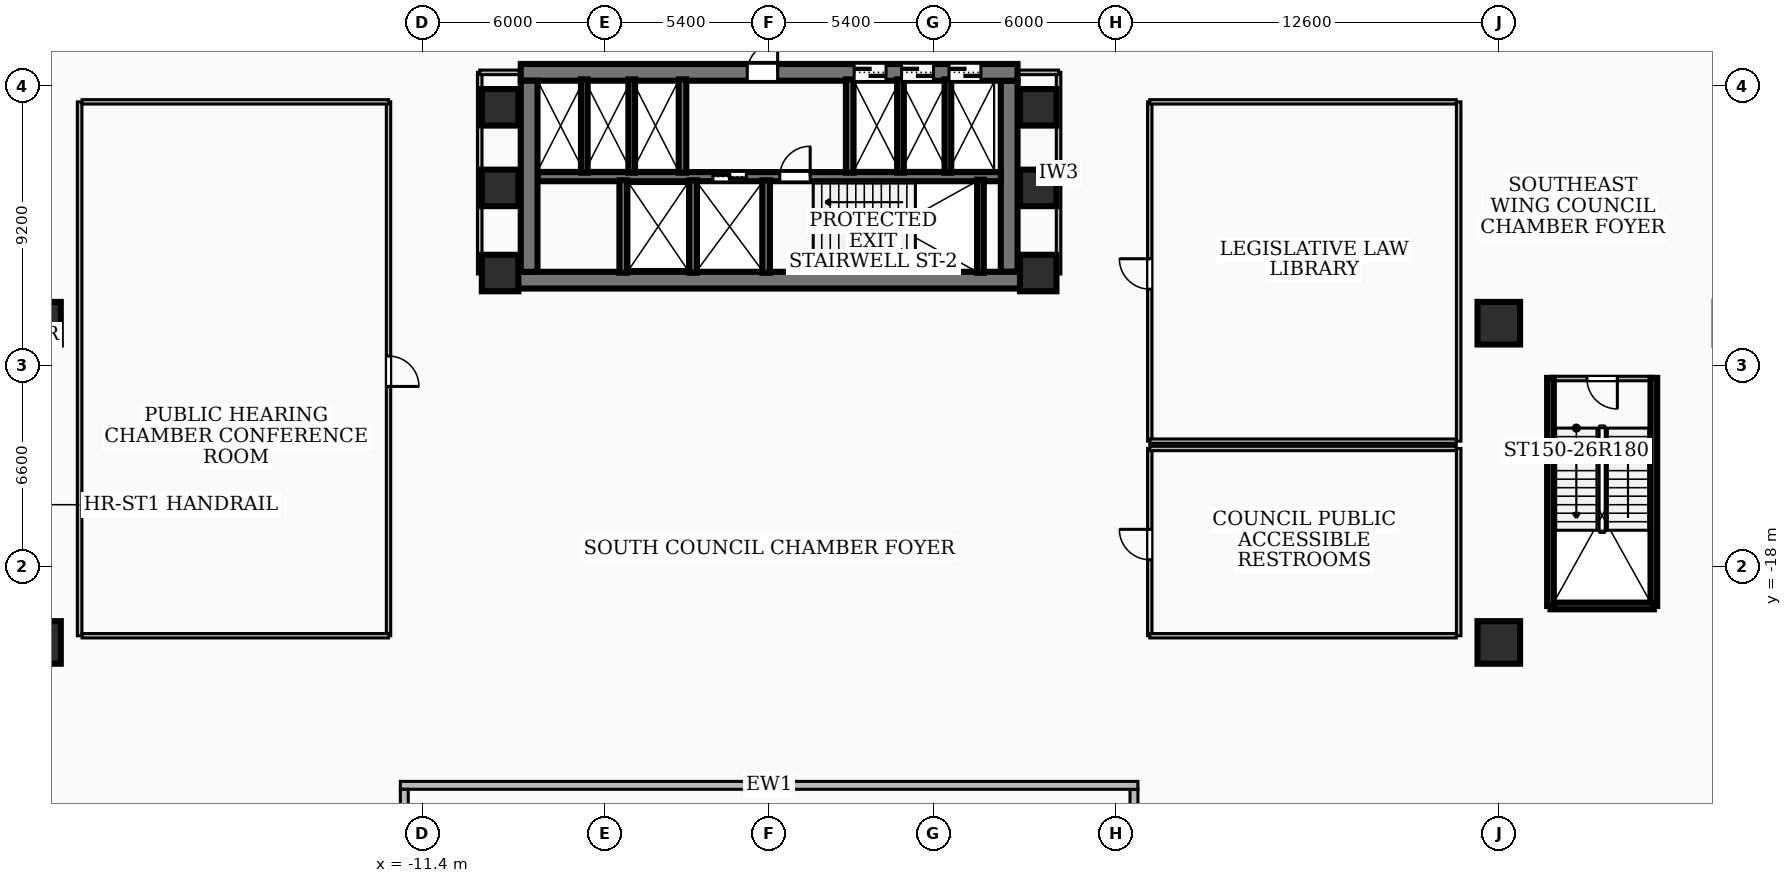
"""IFC4 building model, lengths in metres.
Left out: names, types, materials, properties, quantities, classifications, styles, units other than length and angle.
Written with IfcOpenShell. Run it as: python <this file> out.ifc"""

import sys

from ifc_helpers import new_model, si_unit, direction, frame, frame_2d, origin, origin_2d, place, context, subcontext, project, spatial, rectangle, extrude, element, fill, save


model = new_model("IFC4")
c1 = context("Model", 3, precision=1e-05, world=origin(), true_north=direction((0.0, 1.0)))
c2 = subcontext(c1, "Body", "Model", "MODEL_VIEW")
j1 = project(units=[si_unit("LENGTHUNIT", "METRE"), si_unit("PLANEANGLEUNIT", "RADIAN")], contexts=[c1])
p1 = place(None, origin())
s1 = spatial("IfcSite", under=j1, at=p1, CompositionType="ELEMENT")
p2 = place(p1, origin())
s2 = spatial("IfcBuilding", under=s1, at=p2, CompositionType="ELEMENT")
p3 = place(p2, frame((0.0, 0.0, 10.08)))
s3 = spatial("IfcBuildingStorey", under=s2, at=p3, CompositionType="ELEMENT", Elevation=10.08)
p4 = place(p3, frame((8.78, -8.585, 0.0), z_axis=(0.0, 0.0, 1.0), x_axis=(-1.0, 0.0, 0.0)))
e1 = element("IfcWall", 1, at=p4, inside=s3, PredefinedType="SHEAR", context=c2, shape_type="SweptSolid", body=[
    extrude(rectangle(XDim=17.56, YDim=0.55, at=frame_2d((8.78, 0.0))), origin(), (0.0, 0.0, 1.0), 4.36),
])
p5 = place(p3, frame((-8.17, -1.75, 0.0), z_axis=(0.0, 0.0, 1.0), x_axis=(1.0, 0.0, 0.0)))
e2 = element("IfcWall", 2, at=p5, inside=s3, PredefinedType="SHEAR", context=c2, shape_type="SweptSolid", body=[
    extrude(rectangle(XDim=16.34, YDim=0.55, at=frame_2d((8.17, 0.0))), origin(), (0.0, 0.0, 1.0), 4.36),
])
p6 = place(p5, frame((7.45, 0.0, 0.0)))
e3 = element("IfcOpeningElement", 3, at=p6, cuts=e2, PredefinedType="OPENING", context=c2, shape_type="SweptSolid", body=[
    extrude(rectangle(XDim=1.0, YDim=2.1, at=frame_2d((0.5, 1.05))), frame((0.0, 0.285, 0.0), z_axis=(0.0, -1.0, 0.0), x_axis=(1.0, 0.0, 0.0)), (0.0, 0.0, 1.0), 0.57),
])
p7 = place(p5, frame((10.965, 0.0, 0.0)))
e4 = element("IfcOpeningElement", 4, at=p7, cuts=e2, PredefinedType="OPENING", context=c2, shape_type="SweptSolid", body=[
    extrude(rectangle(XDim=1.05, YDim=2.15, at=frame_2d((0.525, 1.075))), frame((0.0, 0.285, 0.0), z_axis=(0.0, -1.0, 0.0), x_axis=(1.0, 0.0, 0.0)), (0.0, 0.0, 1.0), 0.57),
])
p8 = place(p5, frame((12.525, 0.0, 0.0)))
e5 = element("IfcOpeningElement", 5, at=p8, cuts=e2, PredefinedType="OPENING", context=c2, shape_type="SweptSolid", body=[
    extrude(rectangle(XDim=1.05, YDim=2.15, at=frame_2d((0.525, 1.075))), frame((0.0, 0.285, 0.0), z_axis=(0.0, -1.0, 0.0), x_axis=(1.0, 0.0, 0.0)), (0.0, 0.0, 1.0), 0.57),
])
p9 = place(p5, frame((14.085, 0.0, 0.0)))
e6 = element("IfcOpeningElement", 6, at=p9, cuts=e2, PredefinedType="OPENING", context=c2, shape_type="SweptSolid", body=[
    extrude(rectangle(XDim=1.05, YDim=2.15, at=frame_2d((0.525, 1.075))), frame((0.0, 0.285, 0.0), z_axis=(0.0, -1.0, 0.0), x_axis=(1.0, 0.0, 0.0)), (0.0, 0.0, 1.0), 0.57),
])
for number, where, z_axis, x_axis in (
    (7, (-7.895, -8.31, 0.0), (0.0, 0.0, 1.0), (0.0, 1.0, 0.0)),
    (8, (7.895, -2.025, 0.0), (0.0, 0.0, 1.0), (0.0, -1.0, 0.0)),
):
    element("IfcWall", number, at=place(p3, frame(where, z_axis=z_axis, x_axis=x_axis)), inside=s3, PredefinedType="SHEAR", context=c2, shape_type="SweptSolid", body=[
        extrude(rectangle(XDim=6.285, YDim=0.55, at=frame_2d((3.143, 0.0))), origin(), (0.0, 0.0, 1.0), 4.36),
    ])
p10 = place(p3, frame((-7.62, -5.18, 0.0), z_axis=(0.0, 0.0, 1.0), x_axis=(1.0, 0.0, 0.0)))
e9 = element("IfcWall", 9, at=p10, inside=s3, PredefinedType="SOLIDWALL", context=c2, shape_type="SweptSolid", body=[
    extrude(rectangle(XDim=15.24, YDim=0.3, at=frame_2d((7.62, 0.0))), origin(), (0.0, 0.0, 1.0), 4.36),
])
p11 = place(p10, frame((5.77, 0.0, 0.0)))
e10 = element("IfcOpeningElement", 10, at=p11, cuts=e9, PredefinedType="OPENING", context=c2, shape_type="SweptSolid", body=[
    extrude(rectangle(XDim=1.1, YDim=2.15, at=frame_2d((0.55, 1.075))), frame((0.0, 0.16, 0.0), z_axis=(0.0, -1.0, 0.0), x_axis=(1.0, 0.0, 0.0)), (0.0, 0.0, 1.0), 0.32),
])
p12 = place(p10, frame((7.97, 0.0, 0.0)))
e11 = element("IfcOpeningElement", 11, at=p12, cuts=e9, PredefinedType="OPENING", context=c2, shape_type="SweptSolid", body=[
    extrude(rectangle(XDim=1.0, YDim=2.1, at=frame_2d((0.5, 1.05))), frame((0.0, 0.16, 0.0), z_axis=(0.0, -1.0, 0.0), x_axis=(1.0, 0.0, 0.0)), (0.0, 0.0, 1.0), 0.32),
])
p13 = place(p3, frame((6.95, -8.34, 0.0), z_axis=(0.0, 0.0, 1.0), x_axis=(0.0, 1.0, 0.0)))
e12 = element("IfcWall", 12, at=p13, inside=s3, PredefinedType="SOLIDWALL", context=c2, shape_type="SweptSolid", body=[
    extrude(rectangle(XDim=3.06, YDim=0.22, at=frame_2d((1.53, 0.0))), origin(), (0.0, 0.0, 1.0), 4.36),
])
for number, where, z_axis, x_axis in (
    (13, (-0.1, -8.34, 0.0), (0.0, 0.0, 1.0), (0.0, 1.0, 0.0)),
    (14, (-2.5, -8.34, 0.0), (0.0, 0.0, 1.0), (0.0, 1.0, 0.0)),
    (15, (-4.8, -8.34, 0.0), (0.0, 0.0, 1.0), (0.0, 1.0, 0.0)),
):
    element("IfcWall", number, at=place(p3, frame(where, z_axis=z_axis, x_axis=x_axis)), inside=s3, PredefinedType="SOLIDWALL", context=c2, shape_type="SweptSolid", body=[
        extrude(rectangle(XDim=3.04, YDim=0.25, at=frame_2d((1.52, 0.0))), origin(), (0.0, 0.0, 1.0), 4.36),
    ])
for number, where, z_axis, x_axis in (
    (16, (-2.85, -5.05, 0.0), (0.0, 0.0, 1.0), (0.0, 1.0, 0.0)),
    (17, (2.65, -5.05, 0.0), (0.0, 0.0, 1.0), (0.0, 1.0, 0.0)),
):
    element("IfcWall", number, at=place(p3, frame(where, z_axis=z_axis, x_axis=x_axis)), inside=s3, PredefinedType="SOLIDWALL", context=c2, shape_type="SweptSolid", body=[
        extrude(rectangle(XDim=3.07, YDim=0.25, at=frame_2d((1.535, 0.0))), origin(), (0.0, 0.0, 1.0), 4.36),
    ])
for number, where, z_axis, x_axis in (
    (18, (4.32, -5.05, 0.0), (0.0, 0.0, 1.0), (0.0, 1.0, 0.0)),
    (19, (5.88, -5.05, 0.0), (0.0, 0.0, 1.0), (0.0, 1.0, 0.0)),
    (20, (-6.08, -5.05, 0.0), (0.0, 0.0, 1.0), (0.0, 1.0, 0.0)),
    (21, (-4.52, -5.05, 0.0), (0.0, 0.0, 1.0), (0.0, 1.0, 0.0)),
):
    element("IfcWall", number, at=place(p3, frame(where, z_axis=z_axis, x_axis=x_axis)), inside=s3, PredefinedType="SOLIDWALL", context=c2, shape_type="SweptSolid", body=[
        extrude(rectangle(XDim=3.07, YDim=0.22, at=frame_2d((1.535, 0.0))), origin(), (0.0, 0.0, 1.0), 4.36),
    ])
for number, where, z_axis, x_axis in (
    (22, (25.7, -19.3, 0.0), (0.0, 0.0, 1.0), (0.0, 1.0, 0.0)),
    (23, (29.1, -19.3, 0.0), (0.0, 0.0, 1.0), (0.0, 1.0, 0.0)),
):
    element("IfcWall", number, at=place(p3, frame(where, z_axis=z_axis, x_axis=x_axis)), inside=s3, PredefinedType="SOLIDWALL", context=c2, shape_type="SweptSolid", body=[
        extrude(rectangle(XDim=7.5, YDim=0.22, at=frame_2d((3.75, 0.0))), origin(), (0.0, 0.0, 1.0), 4.36),
    ])
p14 = place(p3, frame((25.7, -19.3, 0.0), z_axis=(0.0, 0.0, 1.0), x_axis=(1.0, 0.0, 0.0)))
e24 = element("IfcWall", 24, at=p14, inside=s3, PredefinedType="SOLIDWALL", context=c2, shape_type="SweptSolid", body=[
    extrude(rectangle(XDim=3.4, YDim=0.22, at=frame_2d((1.7, 0.0))), origin(), (0.0, 0.0, 1.0), 4.36),
])
for number, where, z_axis, x_axis in (
    (25, (-8.85, -5.55, 0.0), (0.0, 0.0, 1.0), (1.0, 0.0, 0.0)),
    (26, (-8.85, -2.9, 0.0), (0.0, 0.0, 1.0), (1.0, 0.0, 0.0)),
    (27, (8.85, -5.55, 0.0), (0.0, 0.0, 1.0), (1.0, 0.0, 0.0)),
    (28, (8.85, -2.9, 0.0), (0.0, 0.0, 1.0), (1.0, 0.0, 0.0)),
    (29, (8.85, -8.35, 0.0), (0.0, 0.0, 1.0), (1.0, 0.0, 0.0)),
    (30, (-8.85, -8.35, 0.0), (0.0, 0.0, 1.0), (1.0, 0.0, 0.0)),
):
    element("IfcColumn", number, at=place(p3, frame(where, z_axis=z_axis, x_axis=x_axis)), inside=s3, PredefinedType="COLUMN", context=c2, shape_type="SweptSolid", body=[
        extrude(rectangle(XDim=1.2, YDim=1.2, at=origin_2d()), origin(), (0.0, 0.0, 1.0), 4.68),
    ])
for number, where, z_axis, x_axis in (
    (31, (-24.0, -10.0, 0.0), (0.0, 0.0, 1.0), (1.0, 0.0, 0.0)),
    (32, (24.0, -10.0, 0.0), (0.0, 0.0, 1.0), (1.0, 0.0, 0.0)),
    (33, (-24.0, -20.5, 0.0), (0.0, 0.0, 1.0), (1.0, 0.0, 0.0)),
    (34, (24.0, -20.5, 0.0), (0.0, 0.0, 1.0), (1.0, 0.0, 0.0)),
):
    element("IfcColumn", number, at=place(p3, frame(where, z_axis=z_axis, x_axis=x_axis)), inside=s3, PredefinedType="COLUMN", context=c2, shape_type="SweptSolid", body=[
        extrude(rectangle(XDim=1.4, YDim=1.4, at=origin_2d()), origin(), (0.0, 0.0, 1.0), 4.68),
    ])
p15 = place(p3, frame((12.0, -27.34, 0.0), z_axis=(0.0, 0.0, 1.0), x_axis=(0.0, 1.0, 0.0)))
e35 = element("IfcWall", 35, at=p15, inside=s3, PredefinedType="SOLIDWALL", context=c2, shape_type="SweptSolid", body=[
    extrude(rectangle(XDim=2.01, YDim=0.26, at=frame_2d((1.005, 0.0))), origin(), (0.0, 0.0, 1.0), 2.152),
])
p16 = place(p3, frame((12.13, -25.2, 0.0), z_axis=(0.0, 0.0, 1.0), x_axis=(-1.0, 0.0, 0.0)))
e36 = element("IfcWall", 36, at=p16, inside=s3, PredefinedType="SOLIDWALL", context=c2, shape_type="SweptSolid", body=[
    extrude(rectangle(XDim=24.26, YDim=0.26, at=frame_2d((12.13, 0.0))), origin(), (0.0, 0.0, 1.0), 3.37),
])
p17 = place(p3, frame((-12.0, -25.33, 0.0), z_axis=(0.0, 0.0, 1.0), x_axis=(0.0, -1.0, 0.0)))
e37 = element("IfcWall", 37, at=p17, inside=s3, PredefinedType="SOLIDWALL", context=c2, shape_type="SweptSolid", body=[
    extrude(rectangle(XDim=2.01, YDim=0.26, at=frame_2d((1.005, 0.0))), origin(), (0.0, 0.0, 1.0), 2.152),
])
p18 = place(p3, frame((29.08, -11.82, 0.0), z_axis=(0.0, 0.0, 1.0), x_axis=(-1.0, 0.0, 0.0)))
e38 = element("IfcWall", 38, at=p18, inside=s3, PredefinedType="PARTITIONING", context=c2, shape_type="SweptSolid", body=[
    extrude(rectangle(XDim=3.36, YDim=0.15, at=frame_2d((1.68, 0.0))), origin(), (0.0, 0.0, 1.0), 4.36),
])
p19 = place(p18, frame((1.18, 0.0, 0.0)))
e39 = element("IfcOpeningElement", 39, at=p19, cuts=e38, PredefinedType="OPENING", context=c2, shape_type="SweptSolid", body=[
    extrude(rectangle(XDim=1.0, YDim=2.1, at=frame_2d((0.5, 1.05))), frame((0.0, 0.085, 0.0), z_axis=(0.0, -1.0, 0.0), x_axis=(1.0, 0.0, 0.0)), (0.0, 0.0, 1.0), 0.17),
])
p20 = place(p3, frame((-9.52, -8.38, 0.0), z_axis=(0.0, 0.0, 1.0), x_axis=(0.0, 1.0, 0.0)))
e40 = element("IfcWall", 40, at=p20, inside=s3, PredefinedType="PARTITIONING", context=c2, shape_type="SweptSolid", body=[
    extrude(rectangle(XDim=6.63, YDim=0.15, at=frame_2d((3.315, 0.0))), origin(), (0.0, 0.0, 1.0), 3.37),
])
p21 = place(p3, frame((-7.85, -1.75, 0.0), z_axis=(0.0, 0.0, 1.0), x_axis=(-1.0, 0.0, 0.0)))
e41 = element("IfcWall", 41, at=p21, inside=s3, PredefinedType="PARTITIONING", context=c2, shape_type="SweptSolid", body=[
    extrude(rectangle(XDim=1.67, YDim=0.15, at=frame_2d((0.835, 0.0))), origin(), (0.0, 0.0, 1.0), 3.425),
])
p22 = place(p3, frame((9.52, -8.38, 0.0), z_axis=(0.0, 0.0, 1.0), x_axis=(0.0, 1.0, 0.0)))
e42 = element("IfcWall", 42, at=p22, inside=s3, PredefinedType="PARTITIONING", context=c2, shape_type="SweptSolid", body=[
    extrude(rectangle(XDim=6.63, YDim=0.15, at=frame_2d((3.315, 0.0))), origin(), (0.0, 0.0, 1.0), 3.37),
])
p23 = place(p3, frame((7.85, -1.75, 0.0), z_axis=(0.0, 0.0, 1.0), x_axis=(1.0, 0.0, 0.0)))
e43 = element("IfcWall", 43, at=p23, inside=s3, PredefinedType="PARTITIONING", context=c2, shape_type="SweptSolid", body=[
    extrude(rectangle(XDim=1.67, YDim=0.15, at=frame_2d((0.835, 0.0))), origin(), (0.0, 0.0, 1.0), 3.425),
])
p24 = place(p3, frame((-12.52, -2.72, 0.0), z_axis=(0.0, 0.0, 1.0), x_axis=(0.0, -1.0, 0.0)))
e44 = element("IfcWall", 44, at=p24, inside=s3, PredefinedType="PARTITIONING", context=c2, shape_type="SweptSolid", body=[
    extrude(rectangle(XDim=17.56, YDim=0.145, at=frame_2d((8.78, 0.0))), origin(), (0.0, 0.0, 1.0), 3.37),
])
p25 = place(p24, frame((8.36, 0.0, 0.0)))
e45 = element("IfcOpeningElement", 45, at=p25, cuts=e44, PredefinedType="OPENING", context=c2, shape_type="SweptSolid", body=[
    extrude(rectangle(XDim=1.0, YDim=2.1, at=frame_2d((0.5, 1.05))), frame((0.0, 0.083, 0.0), z_axis=(0.0, -1.0, 0.0), x_axis=(1.0, 0.0, 0.0)), (0.0, 0.0, 1.0), 0.165),
])
for number, where, z_axis, x_axis in (
    (46, (-22.6, -20.28, 0.0), (0.0, 0.0, 1.0), (1.0, 0.0, 0.0)),
    (47, (-22.6, -2.72, 0.0), (0.0, 0.0, 1.0), (1.0, 0.0, 0.0)),
):
    element("IfcWall", number, at=place(p3, frame(where, z_axis=z_axis, x_axis=x_axis)), inside=s3, PredefinedType="PARTITIONING", context=c2, shape_type="SweptSolid", body=[
        extrude(rectangle(XDim=10.08, YDim=0.145, at=frame_2d((5.04, 0.0))), origin(), (0.0, 0.0, 1.0), 4.36),
    ])
p26 = place(p3, frame((-22.68, -20.28, 0.0), z_axis=(0.0, 0.0, 1.0), x_axis=(0.0, 1.0, 0.0)))
e48 = element("IfcWall", 48, at=p26, inside=s3, PredefinedType="PARTITIONING", context=c2, shape_type="SweptSolid", body=[
    extrude(rectangle(XDim=17.56, YDim=0.15, at=frame_2d((8.78, 0.0))), origin(), (0.0, 0.0, 1.0), 3.37),
])
p27 = place(p3, frame((12.52, -13.88, 0.0), z_axis=(0.0, 0.0, 1.0), x_axis=(0.0, 1.0, 0.0)))
e49 = element("IfcWall", 49, at=p27, inside=s3, PredefinedType="PARTITIONING", context=c2, shape_type="SweptSolid", body=[
    extrude(rectangle(XDim=11.16, YDim=0.145, at=frame_2d((5.58, 0.0))), origin(), (0.0, 0.0, 1.0), 3.37),
])
p28 = place(p27, frame((5.0, 0.0, 0.0)))
e50 = element("IfcOpeningElement", 50, at=p28, cuts=e49, PredefinedType="OPENING", context=c2, shape_type="SweptSolid", body=[
    extrude(rectangle(XDim=1.0, YDim=2.1, at=frame_2d((0.5, 1.05))), frame((0.0, 0.083, 0.0), z_axis=(0.0, -1.0, 0.0), x_axis=(1.0, 0.0, 0.0)), (0.0, 0.0, 1.0), 0.165),
])
for number, where, z_axis, x_axis in (
    (51, (12.52, -13.88, 0.0), (0.0, 0.0, 1.0), (1.0, 0.0, 0.0)),
    (52, (12.52, -2.72, 0.0), (0.0, 0.0, 1.0), (1.0, 0.0, 0.0)),
):
    element("IfcWall", number, at=place(p3, frame(where, z_axis=z_axis, x_axis=x_axis)), inside=s3, PredefinedType="PARTITIONING", context=c2, shape_type="SweptSolid", body=[
        extrude(rectangle(XDim=10.08, YDim=0.145, at=frame_2d((5.04, 0.0))), origin(), (0.0, 0.0, 1.0), 4.36),
    ])
p29 = place(p3, frame((22.68, -13.88, 0.0), z_axis=(0.0, 0.0, 1.0), x_axis=(0.0, 1.0, 0.0)))
e53 = element("IfcWall", 53, at=p29, inside=s3, PredefinedType="PARTITIONING", context=c2, shape_type="SweptSolid", body=[
    extrude(rectangle(XDim=11.16, YDim=0.15, at=frame_2d((5.58, 0.0))), origin(), (0.0, 0.0, 1.0), 3.37),
])
p30 = place(p3, frame((12.52, -20.28, 0.0), z_axis=(0.0, 0.0, 1.0), x_axis=(0.0, 1.0, 0.0)))
e54 = element("IfcWall", 54, at=p30, inside=s3, PredefinedType="PARTITIONING", context=c2, shape_type="SweptSolid", body=[
    extrude(rectangle(XDim=6.16, YDim=0.145, at=frame_2d((3.08, 0.0))), origin(), (0.0, 0.0, 1.0), 4.36),
])
p31 = place(p30, frame((2.5, 0.0, 0.0)))
e55 = element("IfcOpeningElement", 55, at=p31, cuts=e54, PredefinedType="OPENING", context=c2, shape_type="SweptSolid", body=[
    extrude(rectangle(XDim=1.0, YDim=2.1, at=frame_2d((0.5, 1.05))), frame((0.0, 0.083, 0.0), z_axis=(0.0, -1.0, 0.0), x_axis=(1.0, 0.0, 0.0)), (0.0, 0.0, 1.0), 0.165),
])
for number, where, z_axis, x_axis in (
    (56, (12.52, -20.28, 0.0), (0.0, 0.0, 1.0), (1.0, 0.0, 0.0)),
    (57, (12.52, -14.12, 0.0), (0.0, 0.0, 1.0), (1.0, 0.0, 0.0)),
):
    element("IfcWall", number, at=place(p3, frame(where, z_axis=z_axis, x_axis=x_axis)), inside=s3, PredefinedType="PARTITIONING", context=c2, shape_type="SweptSolid", body=[
        extrude(rectangle(XDim=10.08, YDim=0.145, at=frame_2d((5.04, 0.0))), origin(), (0.0, 0.0, 1.0), 4.36),
    ])
p32 = place(p3, frame((22.68, -20.28, 0.0), z_axis=(0.0, 0.0, 1.0), x_axis=(0.0, 1.0, 0.0)))
e58 = element("IfcWall", 58, at=p32, inside=s3, PredefinedType="PARTITIONING", context=c2, shape_type="SweptSolid", body=[
    extrude(rectangle(XDim=6.16, YDim=0.15, at=frame_2d((3.08, 0.0))), origin(), (0.0, 0.0, 1.0), 4.36),
])
p33 = place(p19, origin())
e59 = element("IfcDoor", 59, at=p33, inside=s3, OperationType="SINGLE_SWING_LEFT", PredefinedType="DOOR", context=c2, shape_type="SweptSolid", body=[
    extrude(rectangle(XDim=1.0, YDim=2.1, at=frame_2d((0.5, 1.05))), frame((0.0, 0.025, 0.0), z_axis=(0.0, -1.0, 0.0), x_axis=(1.0, 0.0, 0.0)), (0.0, 0.0, 1.0), 0.05),
])
fill(e39, e59)
p34 = place(p6, origin())
e60 = element("IfcDoor", 60, at=p34, inside=s3, OperationType="SINGLE_SWING_RIGHT", PredefinedType="DOOR", context=c2, shape_type="SweptSolid", body=[
    extrude(rectangle(XDim=1.0, YDim=2.1, at=frame_2d((0.5, 1.05))), frame((0.0, 0.025, 0.0), z_axis=(0.0, -1.0, 0.0), x_axis=(1.0, 0.0, 0.0)), (0.0, 0.0, 1.0), 0.05),
])
fill(e3, e60)
p35 = place(p11, origin())
e61 = element("IfcDoor", 61, at=p35, inside=s3, OperationType="DOUBLE_DOOR_SLIDING", PredefinedType="DOOR", context=c2, shape_type="SweptSolid", body=[
    extrude(rectangle(XDim=1.1, YDim=2.15, at=frame_2d((0.55, 1.075))), frame((0.0, 0.025, 0.0), z_axis=(0.0, -1.0, 0.0), x_axis=(1.0, 0.0, 0.0)), (0.0, 0.0, 1.0), 0.05),
])
fill(e10, e61)
p36 = place(p12, origin())
e62 = element("IfcDoor", 62, at=p36, inside=s3, OperationType="SINGLE_SWING_RIGHT", PredefinedType="DOOR", context=c2, shape_type="SweptSolid", body=[
    extrude(rectangle(XDim=1.0, YDim=2.1, at=frame_2d((0.5, 1.05))), frame((0.0, 0.025, 0.0), z_axis=(0.0, -1.0, 0.0), x_axis=(1.0, 0.0, 0.0)), (0.0, 0.0, 1.0), 0.05),
])
fill(e11, e62)
p37 = place(p7, origin())
e63 = element("IfcDoor", 63, at=p37, inside=s3, OperationType="DOUBLE_DOOR_SLIDING", PredefinedType="DOOR", context=c2, shape_type="SweptSolid", body=[
    extrude(rectangle(XDim=1.05, YDim=2.15, at=frame_2d((0.525, 1.075))), frame((0.0, 0.025, 0.0), z_axis=(0.0, -1.0, 0.0), x_axis=(1.0, 0.0, 0.0)), (0.0, 0.0, 1.0), 0.05),
])
fill(e4, e63)
p38 = place(p8, origin())
e64 = element("IfcDoor", 64, at=p38, inside=s3, OperationType="DOUBLE_DOOR_SLIDING", PredefinedType="DOOR", context=c2, shape_type="SweptSolid", body=[
    extrude(rectangle(XDim=1.05, YDim=2.15, at=frame_2d((0.525, 1.075))), frame((0.0, 0.025, 0.0), z_axis=(0.0, -1.0, 0.0), x_axis=(1.0, 0.0, 0.0)), (0.0, 0.0, 1.0), 0.05),
])
fill(e5, e64)
p39 = place(p9, origin())
e65 = element("IfcDoor", 65, at=p39, inside=s3, OperationType="DOUBLE_DOOR_SLIDING", PredefinedType="DOOR", context=c2, shape_type="SweptSolid", body=[
    extrude(rectangle(XDim=1.05, YDim=2.15, at=frame_2d((0.525, 1.075))), frame((0.0, 0.025, 0.0), z_axis=(0.0, -1.0, 0.0), x_axis=(1.0, 0.0, 0.0)), (0.0, 0.0, 1.0), 0.05),
])
fill(e6, e65)
p40 = place(p25, origin())
e66 = element("IfcDoor", 66, at=p40, inside=s3, OperationType="SINGLE_SWING_RIGHT", PredefinedType="DOOR", context=c2, shape_type="SweptSolid", body=[
    extrude(rectangle(XDim=1.0, YDim=2.1, at=frame_2d((0.5, 1.05))), frame((0.0, 0.025, 0.0), z_axis=(0.0, -1.0, 0.0), x_axis=(1.0, 0.0, 0.0)), (0.0, 0.0, 1.0), 0.05),
])
fill(e45, e66)
p41 = place(p28, origin())
e67 = element("IfcDoor", 67, at=p41, inside=s3, OperationType="SINGLE_SWING_RIGHT", PredefinedType="DOOR", context=c2, shape_type="SweptSolid", body=[
    extrude(rectangle(XDim=1.0, YDim=2.1, at=frame_2d((0.5, 1.05))), frame((0.0, 0.025, 0.0), z_axis=(0.0, -1.0, 0.0), x_axis=(1.0, 0.0, 0.0)), (0.0, 0.0, 1.0), 0.05),
])
fill(e50, e67)
p42 = place(p31, origin())
e68 = element("IfcDoor", 68, at=p42, inside=s3, OperationType="SINGLE_SWING_RIGHT", PredefinedType="DOOR", context=c2, shape_type="SweptSolid", body=[
    extrude(rectangle(XDim=1.0, YDim=2.1, at=frame_2d((0.5, 1.05))), frame((0.0, 0.025, 0.0), z_axis=(0.0, -1.0, 0.0), x_axis=(1.0, 0.0, 0.0)), (0.0, 0.0, 1.0), 0.05),
])
fill(e55, e68)
save(model, sys.argv[1])
